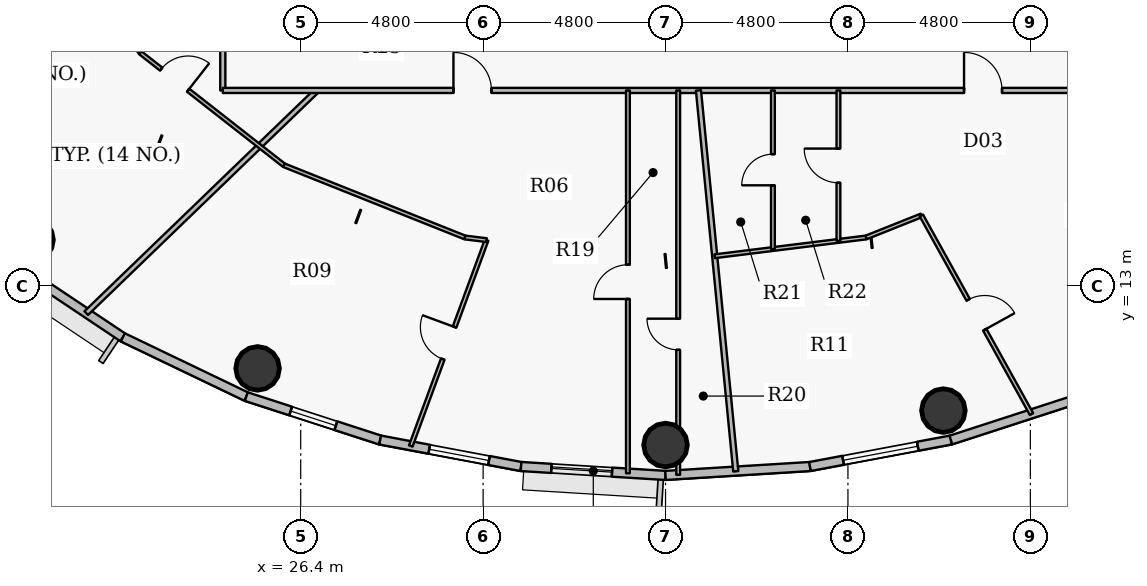
"""IFC4 building model, lengths in metres.
Left out: names, types, materials, properties, quantities, classifications, styles, units other than length and angle.
Written with IfcOpenShell. Run it as: python <this file> out.ifc"""

import sys

from ifc_helpers import new_model, si_unit, direction, frame, frame_2d, origin, origin_2d, place, context, subcontext, project, spatial, rectangle, hollow_circle, extrude, source, transform, mapped, element, fill, save


model = new_model("IFC4")
c1 = context("Model", 3, precision=1e-05, world=origin(), true_north=direction((0.0, 1.0)))
c2 = subcontext(c1, "Body", "Model", "MODEL_VIEW")
j1 = project(units=[si_unit("LENGTHUNIT", "METRE"), si_unit("PLANEANGLEUNIT", "RADIAN")], contexts=[c1])
p1 = place(None, origin())
s1 = spatial("IfcSite", under=j1, at=p1, CompositionType="ELEMENT")
p2 = place(p1, origin())
s2 = spatial("IfcBuilding", under=s1, at=p2, CompositionType="ELEMENT")
p3 = place(p2, frame((0.0, 0.0, 251.55)))
s3 = spatial("IfcBuildingStorey", under=s2, at=p3, CompositionType="ELEMENT", Elevation=251.55)
for number, where, z_axis, x_axis in (
    (1, (19.317, 14.219, 0.0), (0.0, 0.0, 1.0), (1.0, 0.0, 0.0)),
    (2, (25.265, 10.836, 0.0), (0.0, 0.0, 1.0), (1.0, 0.0, 0.0)),
    (3, (36.0, 8.82, 0.0), (0.0, 0.0, 1.0), (1.0, 0.0, 0.0)),
    (4, (43.312, 9.727, 0.0), (0.0, 0.0, 1.0), (1.0, 0.0, 0.0)),
):
    element("IfcColumn", number, at=place(p3, frame(where, z_axis=z_axis, x_axis=x_axis)), inside=s3, PredefinedType="COLUMN", context=c2, shape_type="SweptSolid", body=[
        extrude(hollow_circle(Radius=0.575, WallThickness=0.036, at=origin_2d()), origin(), (0.0, 0.0, 1.0), 3.75),
    ])
p4 = place(p3, frame((21.72, 11.652, 0.0), z_axis=(0.0, 0.0, 1.0), x_axis=(-0.831262496074, 0.555880079352, 0.0)))
e5 = element("IfcWall", 5, at=p4, inside=s3, PredefinedType="SOLIDWALL", context=c2, shape_type="SweptSolid", body=[
    extrude(rectangle(XDim=3.484, YDim=0.24, at=frame_2d((1.742, 0.0))), origin(), (0.0, 0.0, 1.0), 3.5),
])
p5 = place(p3, frame((24.969, 10.094, 0.0), z_axis=(0.0, 0.0, 1.0), x_axis=(-0.901598104751, 0.432574684313, 0.0)))
e6 = element("IfcWall", 6, at=p5, inside=s3, PredefinedType="SOLIDWALL", context=c2, shape_type="SweptSolid", body=[
    extrude(rectangle(XDim=3.604, YDim=0.24, at=frame_2d((1.802, 0.0))), origin(), (0.0, 0.0, 1.0), 3.5),
])
p6 = place(p3, frame((28.491, 8.951, 0.0), z_axis=(0.0, 0.0, 1.0), x_axis=(-0.951210789182, 0.308541787354, 0.0)))
e7 = element("IfcWall", 7, at=p6, inside=s3, PredefinedType="SOLIDWALL", context=c2, shape_type="SweptSolid", body=[
    extrude(rectangle(XDim=3.702, YDim=0.24, at=frame_2d((1.851, 0.0))), origin(), (0.0, 0.0, 1.0), 3.5),
])
p7 = place(p6, frame((1.226, 0.0, 0.9)))
e8 = element("IfcOpeningElement", 8, at=p7, cuts=e7, PredefinedType="OPENING", context=c2, shape_type="SweptSolid", body=[
    extrude(rectangle(XDim=1.25, YDim=1.65, at=origin_2d()), frame((0.625, 0.13, 0.825), z_axis=(0.0, -1.0, 0.0), x_axis=(1.0, 0.0, 0.0)), (0.0, 0.0, 1.0), 0.26),
])
p8 = place(p3, frame((32.198, 8.254, 0.0), z_axis=(0.0, 0.0, 1.0), x_axis=(-0.982784898575, 0.184753465822, 0.0)))
e9 = element("IfcWall", 9, at=p8, inside=s3, PredefinedType="SOLIDWALL", context=c2, shape_type="SweptSolid", body=[
    extrude(rectangle(XDim=3.773, YDim=0.24, at=frame_2d((1.886, 0.0))), origin(), (0.0, 0.0, 1.0), 3.5),
])
p9 = place(p8, frame((0.859, 0.0, 0.9)))
e10 = element("IfcOpeningElement", 10, at=p9, cuts=e9, PredefinedType="OPENING", context=c2, shape_type="SweptSolid", body=[
    extrude(rectangle(XDim=1.6, YDim=1.75, at=origin_2d()), frame((0.8, 0.13, 0.875), z_axis=(0.0, -1.0, 0.0), x_axis=(1.0, 0.0, 0.0)), (0.0, 0.0, 1.0), 0.26),
])
p10 = place(p3, frame((36.0, 8.02, 0.0), z_axis=(0.0, 0.0, 1.0), x_axis=(-0.998108785312, 0.06147237333, 0.0)))
e11 = element("IfcWall", 11, at=p10, inside=s3, PredefinedType="SOLIDWALL", context=c2, shape_type="SweptSolid", body=[
    extrude(rectangle(XDim=3.809, YDim=0.24, at=frame_2d((1.904, 0.0))), origin(), (0.0, 0.0, 1.0), 3.5),
])
p11 = place(p10, frame((1.41, 0.0, 0.9)))
e12 = element("IfcOpeningElement", 12, at=p11, cuts=e11, PredefinedType="OPENING", context=c2, shape_type="SweptSolid", body=[
    extrude(rectangle(XDim=1.6, YDim=1.75, at=origin_2d()), frame((0.8, 0.13, 0.875), z_axis=(0.0, -1.0, 0.0), x_axis=(1.0, 0.0, 0.0)), (0.0, 0.0, 1.0), 0.26),
])
p12 = place(p3, frame((39.802, 8.254, 0.0), z_axis=(0.0, 0.0, 1.0), x_axis=(-0.998108785312, -0.06147237333, 0.0)))
e13 = element("IfcWall", 13, at=p12, inside=s3, PredefinedType="SOLIDWALL", context=c2, shape_type="SweptSolid", body=[
    extrude(rectangle(XDim=3.809, YDim=0.24, at=frame_2d((1.904, 0.0))), origin(), (0.0, 0.0, 1.0), 3.5),
])
p13 = place(p3, frame((43.509, 8.951, 0.0), z_axis=(0.0, 0.0, 1.0), x_axis=(-0.982784898575, -0.184753465822, 0.0)))
e14 = element("IfcWall", 14, at=p13, inside=s3, PredefinedType="SOLIDWALL", context=c2, shape_type="SweptSolid", body=[
    extrude(rectangle(XDim=3.773, YDim=0.24, at=frame_2d((1.886, 0.0))), origin(), (0.0, 0.0, 1.0), 3.5),
])
p14 = place(p13, frame((0.886, 0.0, 0.9)))
e15 = element("IfcOpeningElement", 15, at=p14, cuts=e14, PredefinedType="OPENING", context=c2, shape_type="SweptSolid", body=[
    extrude(rectangle(XDim=2.0, YDim=1.75, at=origin_2d()), frame((1.0, 0.13, 0.875), z_axis=(0.0, -1.0, 0.0), x_axis=(1.0, 0.0, 0.0)), (0.0, 0.0, 1.0), 0.26),
])
p15 = place(p3, frame((47.031, 10.094, 0.0), z_axis=(0.0, 0.0, 1.0), x_axis=(-0.951210789182, -0.308541787354, 0.0)))
e16 = element("IfcWall", 16, at=p15, inside=s3, PredefinedType="SOLIDWALL", context=c2, shape_type="SweptSolid", body=[
    extrude(rectangle(XDim=3.702, YDim=0.24, at=frame_2d((1.851, 0.0))), origin(), (0.0, 0.0, 1.0), 3.5),
])
p16 = place(p3, frame((20.756, 12.291, 0.0), z_axis=(0.0, 0.0, 1.0), x_axis=(0.719623273788, 0.694364705196, 0.0)))
e17 = element("IfcWall", 17, at=p16, inside=s3, PredefinedType="PARTITIONING", context=c2, shape_type="SweptSolid", body=[
    extrude(rectangle(XDim=8.438, YDim=0.135, at=frame_2d((4.219, 0.0))), origin(), (0.0, 0.0, 1.0), 2.985),
])
p17 = place(p3, frame((21.856, 19.641, 0.0), z_axis=(0.0, 0.0, 1.0), x_axis=(0.545246536912, -0.838275738636, 0.0)))
e18 = element("IfcWall", 18, at=p17, inside=s3, PredefinedType="PARTITIONING", context=c2, shape_type="SweptSolid", body=[
    extrude(rectangle(XDim=0.598, YDim=0.1, at=frame_2d((0.299, 0.0))), origin(), (0.0, 0.0, 1.0), 3.5),
])
p18 = place(p3, frame((22.182, 19.139, 0.0), z_axis=(0.0, 0.0, 1.0), x_axis=(0.787386902975, -0.616459134917, 0.0)))
e19 = element("IfcWall", 19, at=p18, inside=s3, PredefinedType="PARTITIONING", context=c2, shape_type="SweptSolid", body=[
    extrude(rectangle(XDim=4.799, YDim=0.1, at=frame_2d((2.399, 0.0))), origin(), (0.0, 0.0, 1.0), 2.935),
])
p19 = place(p18, frame((0.695, 0.0, 0.0)))
e20 = element("IfcOpeningElement", 20, at=p19, cuts=e19, PredefinedType="OPENING", context=c2, shape_type="SweptSolid", body=[
    extrude(rectangle(XDim=0.9, YDim=2.1, at=origin_2d()), frame((0.45, 0.06, 1.05), z_axis=(0.0, -1.0, 0.0), x_axis=(1.0, 0.0, 0.0)), (0.0, 0.0, 1.0), 0.12),
])
p20 = place(p3, frame((24.35, 18.15, 0.0), z_axis=(0.0, 0.0, 1.0), x_axis=(0.0, 1.0, 0.0)))
e21 = element("IfcWall", 21, at=p20, inside=s3, PredefinedType="PARTITIONING", context=c2, shape_type="SweptSolid", body=[
    extrude(rectangle(XDim=6.585, YDim=0.135, at=frame_2d((3.293, 0.0))), origin(), (0.0, 0.0, 1.0), 2.935),
])
p21 = place(p3, frame((24.35, 18.15, 0.0), z_axis=(0.0, 0.0, 1.0), x_axis=(1.0, 0.0, 0.0)))
e22 = element("IfcWall", 22, at=p21, inside=s3, PredefinedType="PARTITIONING", context=c2, shape_type="SweptSolid", body=[
    extrude(rectangle(XDim=23.85, YDim=0.135, at=frame_2d((11.925, 0.0))), origin(), (0.0, 0.0, 1.0), 2.935),
])
p22 = place(p21, frame((6.069, 0.0, 0.0)))
e23 = element("IfcOpeningElement", 23, at=p22, cuts=e22, PredefinedType="OPENING", context=c2, shape_type="SweptSolid", body=[
    extrude(rectangle(XDim=1.0, YDim=2.15, at=origin_2d()), frame((0.5, 0.078, 1.075), z_axis=(0.0, -1.0, 0.0), x_axis=(1.0, 0.0, 0.0)), (0.0, 0.0, 1.0), 0.155),
])
p23 = place(p21, frame((19.505, 0.0, 0.0)))
e24 = element("IfcOpeningElement", 24, at=p23, cuts=e22, PredefinedType="OPENING", context=c2, shape_type="SweptSolid", body=[
    extrude(rectangle(XDim=1.0, YDim=2.15, at=origin_2d()), frame((0.5, 0.078, 1.075), z_axis=(0.0, -1.0, 0.0), x_axis=(1.0, 0.0, 0.0)), (0.0, 0.0, 1.0), 0.155),
])
p24 = place(p3, frame((25.961, 16.181, 0.0), z_axis=(0.0, 0.0, 1.0), x_axis=(0.928801505367, -0.370577608105, 0.0)))
e25 = element("IfcWall", 25, at=p24, inside=s3, PredefinedType="PARTITIONING", context=c2, shape_type="SweptSolid", body=[
    extrude(rectangle(XDim=5.126, YDim=0.1, at=frame_2d((2.563, 0.0))), origin(), (0.0, 0.0, 1.0), 2.935),
])
p25 = place(p3, frame((29.296, 8.795, 0.0), z_axis=(0.0, 0.0, 1.0), x_axis=(0.345568130342, 0.938393663284, 0.0)))
e26 = element("IfcWall", 26, at=p25, inside=s3, PredefinedType="PARTITIONING", context=c2, shape_type="SweptSolid", body=[
    extrude(rectangle(XDim=5.771, YDim=0.1, at=frame_2d((2.886, 0.0))), origin(), (0.0, 0.0, 1.0), 2.985),
])
p26 = place(p25, frame((2.436, 0.0, 0.0)))
e27 = element("IfcOpeningElement", 27, at=p26, cuts=e26, PredefinedType="OPENING", context=c2, shape_type="SweptSolid", body=[
    extrude(rectangle(XDim=0.9, YDim=2.1, at=origin_2d()), frame((0.45, 0.06, 1.05), z_axis=(0.0, -1.0, 0.0), x_axis=(1.0, 0.0, 0.0)), (0.0, 0.0, 1.0), 0.12),
])
p27 = place(p3, frame((30.722, 14.281, 0.0), z_axis=(0.0, 0.0, 1.0), x_axis=(0.992395375367, -0.123091100206, 0.0)))
e28 = element("IfcWall", 28, at=p27, inside=s3, PredefinedType="PARTITIONING", context=c2, shape_type="SweptSolid", body=[
    extrude(rectangle(XDim=0.573, YDim=0.1, at=frame_2d((0.287, 0.0))), origin(), (0.0, 0.0, 1.0), 3.5),
])
p28 = place(p3, frame((35.01, 8.076, 0.0), z_axis=(0.0, 0.0, 1.0), x_axis=(0.0, 1.0, 0.0)))
e29 = element("IfcWall", 29, at=p28, inside=s3, PredefinedType="PARTITIONING", context=c2, shape_type="SweptSolid", body=[
    extrude(rectangle(XDim=10.074, YDim=0.1, at=frame_2d((5.037, 0.0))), origin(), (0.0, 0.0, 1.0), 2.985),
])
p29 = place(p28, frame((4.587, 0.0, 0.0)))
e30 = element("IfcOpeningElement", 30, at=p29, cuts=e29, PredefinedType="OPENING", context=c2, shape_type="SweptSolid", body=[
    extrude(rectangle(XDim=0.9, YDim=2.1, at=origin_2d()), frame((0.45, 0.06, 1.05), z_axis=(0.0, -1.0, 0.0), x_axis=(1.0, 0.0, 0.0)), (0.0, 0.0, 1.0), 0.12),
])
p30 = place(p3, frame((36.333, 8.035, 0.0), z_axis=(0.0, 0.0, 1.0), x_axis=(0.0, 1.0, 0.0)))
e31 = element("IfcWall", 31, at=p30, inside=s3, PredefinedType="PARTITIONING", context=c2, shape_type="SweptSolid", body=[
    extrude(rectangle(XDim=10.115, YDim=0.1, at=frame_2d((5.057, 0.0))), origin(), (0.0, 0.0, 1.0), 3.185),
])
p31 = place(p30, frame((3.289, 0.0, 0.0)))
e32 = element("IfcOpeningElement", 32, at=p31, cuts=e31, PredefinedType="OPENING", context=c2, shape_type="SweptSolid", body=[
    extrude(rectangle(XDim=0.82, YDim=2.1, at=origin_2d()), frame((0.41, 0.06, 1.05), z_axis=(0.0, -1.0, 0.0), x_axis=(1.0, 0.0, 0.0)), (0.0, 0.0, 1.0), 0.12),
])
p32 = place(p3, frame((36.867, 18.15, 0.0), z_axis=(0.0, 0.0, 1.0), x_axis=(0.097472533874, -0.995238215273, 0.0)))
e33 = element("IfcWall", 33, at=p32, inside=s3, PredefinedType="PARTITIONING", context=c2, shape_type="SweptSolid", body=[
    extrude(rectangle(XDim=10.069, YDim=0.135, at=frame_2d((5.034, 0.0))), origin(), (0.0, 0.0, 1.0), 2.985),
])
p33 = place(p3, frame((37.294, 13.787, 0.0), z_axis=(0.0, 0.0, 1.0), x_axis=(0.992396239348, 0.123084134349, 0.0)))
e34 = element("IfcWall", 34, at=p33, inside=s3, PredefinedType="PARTITIONING", context=c2, shape_type="SweptSolid", body=[
    extrude(rectangle(XDim=4.015, YDim=0.1, at=frame_2d((2.007, 0.0))), origin(), (0.0, 0.0, 1.0), 2.935),
])
p34 = place(p3, frame((38.826, 13.977, 0.0), z_axis=(0.0, 0.0, 1.0), x_axis=(0.0, 1.0, 0.0)))
e35 = element("IfcWall", 35, at=p34, inside=s3, PredefinedType="PARTITIONING", context=c2, shape_type="SweptSolid", body=[
    extrude(rectangle(XDim=4.173, YDim=0.1, at=frame_2d((2.086, 0.0))), origin(), (0.0, 0.0, 1.0), 3.185),
])
p35 = place(p34, frame((1.677, 0.0, 0.0)))
e36 = element("IfcOpeningElement", 36, at=p35, cuts=e35, PredefinedType="OPENING", context=c2, shape_type="SweptSolid", body=[
    extrude(rectangle(XDim=0.82, YDim=2.1, at=origin_2d()), frame((0.41, 0.06, 1.05), z_axis=(0.0, -1.0, 0.0), x_axis=(1.0, 0.0, 0.0)), (0.0, 0.0, 1.0), 0.12),
])
p36 = place(p3, frame((40.55, 14.191, 0.0), z_axis=(0.0, 0.0, 1.0), x_axis=(0.0, 1.0, 0.0)))
e37 = element("IfcWall", 37, at=p36, inside=s3, PredefinedType="PARTITIONING", context=c2, shape_type="SweptSolid", body=[
    extrude(rectangle(XDim=3.959, YDim=0.1, at=frame_2d((1.979, 0.0))), origin(), (0.0, 0.0, 1.0), 2.935),
])
p37 = place(p36, frame((1.53, 0.0, 0.0)))
e38 = element("IfcOpeningElement", 38, at=p37, cuts=e37, PredefinedType="OPENING", context=c2, shape_type="SweptSolid", body=[
    extrude(rectangle(XDim=0.9, YDim=2.1, at=origin_2d()), frame((0.45, 0.06, 1.05), z_axis=(0.0, -1.0, 0.0), x_axis=(1.0, 0.0, 0.0)), (0.0, 0.0, 1.0), 0.12),
])
p38 = place(p3, frame((41.278, 14.281, 0.0), z_axis=(0.0, 0.0, 1.0), x_axis=(0.928799036151, 0.370583796792, 0.0)))
e39 = element("IfcWall", 39, at=p38, inside=s3, PredefinedType="PARTITIONING", context=c2, shape_type="SweptSolid", body=[
    extrude(rectangle(XDim=1.565, YDim=0.1, at=frame_2d((0.783, 0.0))), origin(), (0.0, 0.0, 1.0), 2.935),
])
p39 = place(p3, frame((42.732, 14.861, 0.0), z_axis=(0.0, 0.0, 1.0), x_axis=(0.485004680322, -0.874511555136, 0.0)))
e40 = element("IfcWall", 40, at=p39, inside=s3, PredefinedType="PARTITIONING", context=c2, shape_type="SweptSolid", body=[
    extrude(rectangle(XDim=5.977, YDim=0.1, at=frame_2d((2.989, 0.0))), origin(), (0.0, 0.0, 1.0), 2.985),
])
p40 = place(p39, frame((2.539, 0.0, 0.0)))
e41 = element("IfcOpeningElement", 41, at=p40, cuts=e40, PredefinedType="OPENING", context=c2, shape_type="SweptSolid", body=[
    extrude(rectangle(XDim=0.9, YDim=2.1, at=origin_2d()), frame((0.45, 0.06, 1.05), z_axis=(0.0, -1.0, 0.0), x_axis=(1.0, 0.0, 0.0)), (0.0, 0.0, 1.0), 0.12),
])
m1 = source(origin(), c2, "Body", "SweptSolid", [
    extrude(rectangle(XDim=1.6, YDim=1.75, at=origin_2d()), frame((0.8, 0.03, 0.875), z_axis=(0.0, -1.0, 0.0), x_axis=(1.0, 0.0, 0.0)), (0.0, 0.0, 1.0), 0.06),
])
p41 = place(p9, origin())
e42 = element("IfcWindow", 42, at=p41, inside=s3, PartitioningType="DOUBLE_PANEL_VERTICAL", PredefinedType="WINDOW", context=c2, shape_type="MappedRepresentation", body=[
    mapped(m1, transform((0.0, 0.0, 0.0), x_axis=(1.0, 0.0, 0.0), y_axis=(0.0, 1.0, 0.0), z_axis=(0.0, 0.0, 1.0), scale=1.0)),
])
fill(e10, e42)
p42 = place(p11, origin())
e43 = element("IfcWindow", 43, at=p42, inside=s3, PartitioningType="DOUBLE_PANEL_VERTICAL", PredefinedType="WINDOW", context=c2, shape_type="MappedRepresentation", body=[
    mapped(m1, transform((0.0, 0.0, 0.0), x_axis=(1.0, 0.0, 0.0), y_axis=(0.0, 1.0, 0.0), z_axis=(0.0, 0.0, 1.0), scale=1.0)),
])
fill(e12, e43)
m2 = source(origin(), c2, "Body", "SweptSolid", [
    extrude(rectangle(XDim=2.0, YDim=1.75, at=origin_2d()), frame((1.0, 0.03, 0.875), z_axis=(0.0, -1.0, 0.0), x_axis=(1.0, 0.0, 0.0)), (0.0, 0.0, 1.0), 0.06),
])
p43 = place(p14, origin())
e44 = element("IfcWindow", 44, at=p43, inside=s3, PartitioningType="DOUBLE_PANEL_VERTICAL", PredefinedType="WINDOW", context=c2, shape_type="MappedRepresentation", body=[
    mapped(m2, transform((0.0, 0.0, 0.0), x_axis=(1.0, 0.0, 0.0), y_axis=(0.0, 1.0, 0.0), z_axis=(0.0, 0.0, 1.0), scale=1.0)),
])
fill(e15, e44)
m3 = source(origin(), c2, "Body", "SweptSolid", [
    extrude(rectangle(XDim=1.25, YDim=1.65, at=origin_2d()), frame((0.625, 0.03, 0.825), z_axis=(0.0, -1.0, 0.0), x_axis=(1.0, 0.0, 0.0)), (0.0, 0.0, 1.0), 0.06),
])
p44 = place(p7, origin())
e45 = element("IfcWindow", 45, at=p44, inside=s3, PartitioningType="SINGLE_PANEL", PredefinedType="WINDOW", context=c2, shape_type="MappedRepresentation", body=[
    mapped(m3, transform((0.0, 0.0, 0.0), x_axis=(1.0, 0.0, 0.0), y_axis=(0.0, 1.0, 0.0), z_axis=(0.0, 0.0, 1.0), scale=1.0)),
])
fill(e8, e45)
m4 = source(origin(), c2, "Body", "SweptSolid", [
    extrude(rectangle(XDim=0.9, YDim=2.1, at=origin_2d()), frame((0.45, 0.025, 1.05), z_axis=(0.0, -1.0, 0.0), x_axis=(1.0, 0.0, 0.0)), (0.0, 0.0, 1.0), 0.05),
])
p45 = place(p19, origin())
e46 = element("IfcDoor", 46, at=p45, inside=s3, OperationType="SINGLE_SWING_RIGHT", PredefinedType="DOOR", context=c2, shape_type="MappedRepresentation", body=[
    mapped(m4, transform((0.0, 0.0, 0.0), x_axis=(1.0, 0.0, 0.0), y_axis=(0.0, 1.0, 0.0), z_axis=(0.0, 0.0, 1.0), scale=1.0)),
])
fill(e20, e46)
m5 = source(origin(), c2, "Body", "SweptSolid", [
    extrude(rectangle(XDim=1.0, YDim=2.15, at=origin_2d()), frame((0.5, 0.025, 1.075), z_axis=(0.0, -1.0, 0.0), x_axis=(1.0, 0.0, 0.0)), (0.0, 0.0, 1.0), 0.05),
])
p46 = place(p22, origin())
e47 = element("IfcDoor", 47, at=p46, inside=s3, OperationType="SINGLE_SWING_LEFT", PredefinedType="DOOR", context=c2, shape_type="MappedRepresentation", body=[
    mapped(m5, transform((0.0, 0.0, 0.0), x_axis=(1.0, 0.0, 0.0), y_axis=(0.0, 1.0, 0.0), z_axis=(0.0, 0.0, 1.0), scale=1.0)),
])
fill(e23, e47)
p47 = place(p26, origin())
e48 = element("IfcDoor", 48, at=p47, inside=s3, OperationType="SINGLE_SWING_RIGHT", PredefinedType="DOOR", context=c2, shape_type="MappedRepresentation", body=[
    mapped(m4, transform((0.0, 0.0, 0.0), x_axis=(1.0, 0.0, 0.0), y_axis=(0.0, 1.0, 0.0), z_axis=(0.0, 0.0, 1.0), scale=1.0)),
])
fill(e27, e48)
p48 = place(p29, origin())
e49 = element("IfcDoor", 49, at=p48, inside=s3, OperationType="SINGLE_SWING_LEFT", PredefinedType="DOOR", context=c2, shape_type="MappedRepresentation", body=[
    mapped(m4, transform((0.0, 0.0, 0.0), x_axis=(1.0, 0.0, 0.0), y_axis=(0.0, 1.0, 0.0), z_axis=(0.0, 0.0, 1.0), scale=1.0)),
])
fill(e30, e49)
m6 = source(origin(), c2, "Body", "SweptSolid", [
    extrude(rectangle(XDim=0.82, YDim=2.1, at=origin_2d()), frame((0.41, 0.025, 1.05), z_axis=(0.0, -1.0, 0.0), x_axis=(1.0, 0.0, 0.0)), (0.0, 0.0, 1.0), 0.05),
])
p49 = place(p31, origin())
e50 = element("IfcDoor", 50, at=p49, inside=s3, OperationType="SINGLE_SWING_RIGHT", PredefinedType="DOOR", context=c2, shape_type="MappedRepresentation", body=[
    mapped(m6, transform((0.0, 0.0, 0.0), x_axis=(1.0, 0.0, 0.0), y_axis=(0.0, 1.0, 0.0), z_axis=(0.0, 0.0, 1.0), scale=1.0)),
])
fill(e32, e50)
p50 = place(p23, origin())
e51 = element("IfcDoor", 51, at=p50, inside=s3, OperationType="SINGLE_SWING_LEFT", PredefinedType="DOOR", context=c2, shape_type="MappedRepresentation", body=[
    mapped(m5, transform((0.0, 0.0, 0.0), x_axis=(1.0, 0.0, 0.0), y_axis=(0.0, 1.0, 0.0), z_axis=(0.0, 0.0, 1.0), scale=1.0)),
])
fill(e24, e51)
p51 = place(p40, origin())
e52 = element("IfcDoor", 52, at=p51, inside=s3, OperationType="SINGLE_SWING_RIGHT", PredefinedType="DOOR", context=c2, shape_type="MappedRepresentation", body=[
    mapped(m4, transform((0.0, 0.0, 0.0), x_axis=(1.0, 0.0, 0.0), y_axis=(0.0, 1.0, 0.0), z_axis=(0.0, 0.0, 1.0), scale=1.0)),
])
fill(e41, e52)
p52 = place(p37, origin())
e53 = element("IfcDoor", 53, at=p52, inside=s3, OperationType="SINGLE_SWING_RIGHT", PredefinedType="DOOR", context=c2, shape_type="MappedRepresentation", body=[
    mapped(m4, transform((0.0, 0.0, 0.0), x_axis=(1.0, 0.0, 0.0), y_axis=(0.0, 1.0, 0.0), z_axis=(0.0, 0.0, 1.0), scale=1.0)),
])
fill(e38, e53)
p53 = place(p35, origin())
e54 = element("IfcDoor", 54, at=p53, inside=s3, OperationType="SINGLE_SWING_LEFT", PredefinedType="DOOR", context=c2, shape_type="MappedRepresentation", body=[
    mapped(m6, transform((0.0, 0.0, 0.0), x_axis=(1.0, 0.0, 0.0), y_axis=(0.0, 1.0, 0.0), z_axis=(0.0, 0.0, 1.0), scale=1.0)),
])
fill(e36, e54)
save(model, sys.argv[1])
